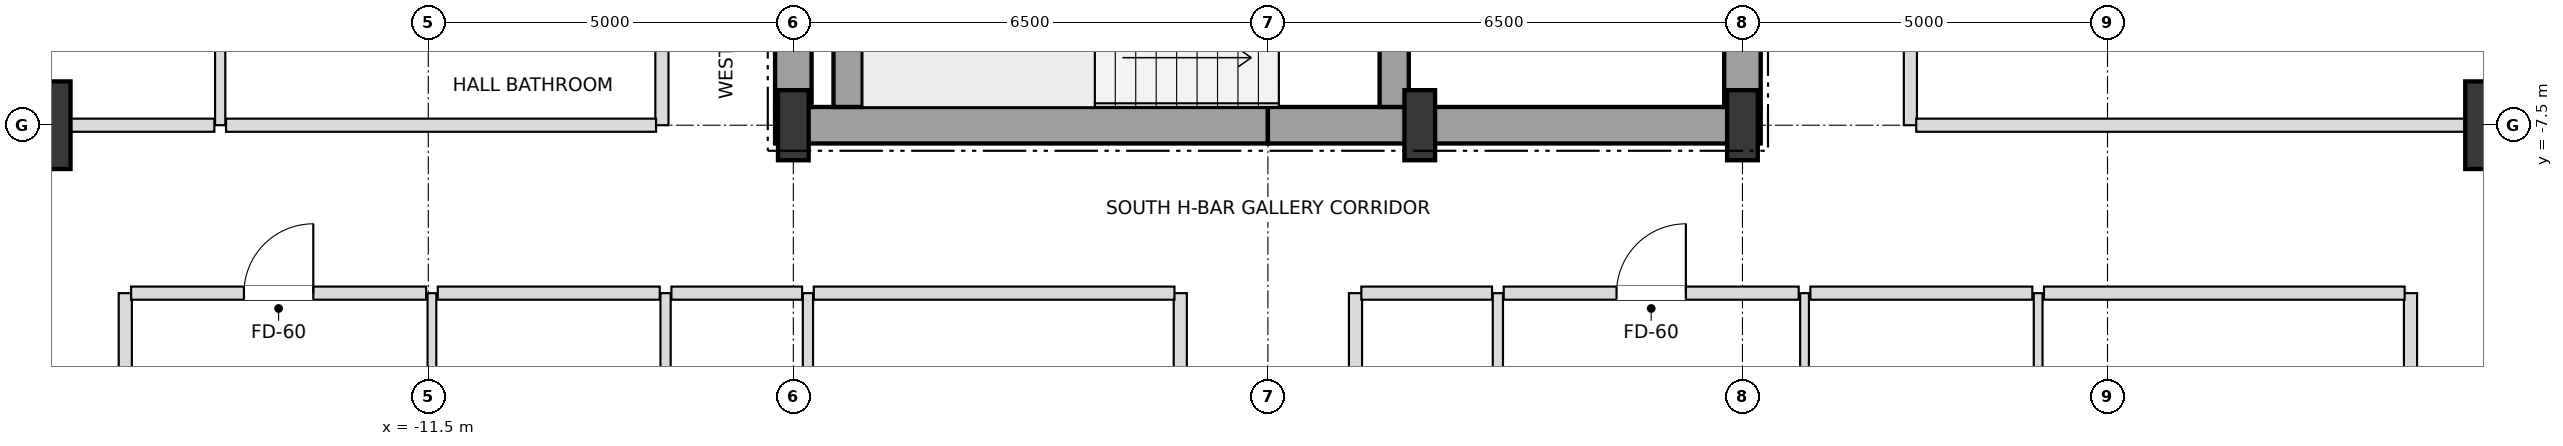
"""IFC4 building model, lengths in metres.
Left out: names, types, materials, properties, quantities, classifications, styles, units other than length and angle.
Written with IfcOpenShell. Run it as: python <this file> out.ifc"""

import sys

from ifc_helpers import new_model, si_unit, direction, frame, frame_2d, origin, origin_2d, place, context, subcontext, project, spatial, rectangle, i_section, extrude, element, fill, save


model = new_model("IFC4")
c1 = context("Model", 3, precision=1e-05, world=origin(), true_north=direction((0.0, 1.0)))
c2 = subcontext(c1, "Body", "Model", "MODEL_VIEW")
j1 = project(units=[si_unit("LENGTHUNIT", "METRE"), si_unit("PLANEANGLEUNIT", "RADIAN")], contexts=[c1])
p1 = place(None, origin())
s1 = spatial("IfcSite", under=j1, at=p1, CompositionType="ELEMENT")
p2 = place(p1, origin())
s2 = spatial("IfcBuilding", under=s1, at=p2, CompositionType="ELEMENT")
p3 = place(p2, frame((0.0, 0.0, 133.2)))
s3 = spatial("IfcBuildingStorey", under=s2, at=p3, CompositionType="ELEMENT", Elevation=133.2)
for number, where, z_axis, x_axis in (
    (1, (-6.5, -7.5, 0.0), (0.0, 0.0, 1.0), (1.0, 0.0, 0.0)),
    (2, (2.08, -7.5, 0.0), (0.0, 0.0, 1.0), (1.0, 0.0, 0.0)),
    (3, (6.5, -7.5, 0.0), (0.0, 0.0, 1.0), (1.0, 0.0, 0.0)),
):
    element("IfcColumn", number, at=place(p3, frame(where, z_axis=z_axis, x_axis=x_axis)), inside=s3, PredefinedType="COLUMN", context=c2, shape_type="SweptSolid", body=[
        extrude(i_section(OverallWidth=0.42, OverallDepth=0.96, WebThickness=0.022, FlangeThickness=0.034, at=origin_2d()), origin(), (0.0, 0.0, 1.0), 3.6),
    ])
for number, where, z_axis, x_axis in (
    (4, (17.0, -7.5, 0.0), (0.0, 0.0, 1.0), (1.0, 0.0, 0.0)),
    (5, (-17.0, -7.5, 0.0), (0.0, 0.0, 1.0), (1.0, 0.0, 0.0)),
):
    element("IfcColumn", number, at=place(p3, frame(where, z_axis=z_axis, x_axis=x_axis)), inside=s3, PredefinedType="USERDEFINED", context=c2, shape_type="SweptSolid", body=[
        extrude(rectangle(XDim=1.2, YDim=1.2, at=origin_2d()), origin(), (0.0, 0.0, 1.0), 3.6),
    ])
for number, where, z_axis, x_axis in (
    (6, (-6.75, -7.5, 0.0), (0.0, 0.0, 1.0), (1.0, 0.0, 0.0)),
    (7, (0.0, -7.5, 0.0), (0.0, 0.0, 1.0), (1.0, 0.0, 0.0)),
):
    element("IfcWall", number, at=place(p3, frame(where, z_axis=z_axis, x_axis=x_axis)), inside=s3, PredefinedType="SHEAR", context=c2, shape_type="SweptSolid", body=[
        extrude(rectangle(XDim=6.75, YDim=0.5, at=frame_2d((3.375, 0.0))), origin(), (0.0, 0.0, 1.0), 3.38),
    ])
p4 = place(p3, frame((-6.5, -7.25, 0.0), z_axis=(0.0, 0.0, 1.0), x_axis=(0.0, 1.0, 0.0)))
e8 = element("IfcWall", 8, at=p4, inside=s3, PredefinedType="SHEAR", context=c2, shape_type="SweptSolid", body=[
    extrude(rectangle(XDim=3.55, YDim=0.5, at=frame_2d((1.775, 0.0))), origin(), (0.0, 0.0, 1.0), 3.38),
])
p5 = place(p3, frame((6.5, -7.25, 0.0), z_axis=(0.0, 0.0, 1.0), x_axis=(0.0, 1.0, 0.0)))
e9 = element("IfcWall", 9, at=p5, inside=s3, PredefinedType="SHEAR", context=c2, shape_type="SweptSolid", body=[
    extrude(rectangle(XDim=5.75, YDim=0.5, at=frame_2d((2.875, 0.0))), origin(), (0.0, 0.0, 1.0), 3.38),
])
p6 = place(p5, frame((0.85, 0.0, 0.0)))
e10 = element("IfcOpeningElement", 10, at=p6, cuts=e9, PredefinedType="OPENING", context=c2, shape_type="SweptSolid", body=[
    extrude(rectangle(XDim=1.05, YDim=2.15, at=frame_2d((0.525, 1.075))), frame((0.0, 0.26, 0.0), z_axis=(0.0, -1.0, 0.0), x_axis=(1.0, 0.0, 0.0)), (0.0, 0.0, 1.0), 0.52),
])
p7 = place(p3, frame((-5.75, -7.25, 0.0), z_axis=(0.0, 0.0, 1.0), x_axis=(0.0, 1.0, 0.0)))
e11 = element("IfcWall", 11, at=p7, inside=s3, PredefinedType="SHEAR", context=c2, shape_type="SweptSolid", body=[
    extrude(rectangle(XDim=2.9, YDim=0.4, at=frame_2d((1.45, 0.0))), origin(), (0.0, 0.0, 1.0), 3.38),
])
p8 = place(p3, frame((1.73, -7.25, 0.0), z_axis=(0.0, 0.0, 1.0), x_axis=(0.0, 1.0, 0.0)))
e12 = element("IfcWall", 12, at=p8, inside=s3, PredefinedType="SHEAR", context=c2, shape_type="SweptSolid", body=[
    extrude(rectangle(XDim=3.3, YDim=0.4, at=frame_2d((1.65, 0.0))), origin(), (0.0, 0.0, 1.0), 3.38),
])
p9 = place(p8, frame((0.9, 0.0, 0.0)))
e13 = element("IfcOpeningElement", 13, at=p9, cuts=e12, PredefinedType="OPENING", context=c2, shape_type="SweptSolid", body=[
    extrude(rectangle(XDim=1.05, YDim=2.15, at=frame_2d((0.525, 1.075))), frame((0.0, 0.21, 0.0), z_axis=(0.0, -1.0, 0.0), x_axis=(1.0, 0.0, 0.0)), (0.0, 0.0, 1.0), 0.42),
])
p10 = place(p3, frame((-15.65, -17.15, 0.0), z_axis=(0.0, 0.0, 1.0), x_axis=(0.0, 1.0, 0.0)))
e14 = element("IfcWall", 14, at=p10, inside=s3, PredefinedType="PARTITIONING", context=c2, shape_type="SweptSolid", body=[
    extrude(rectangle(XDim=7.35, YDim=0.18, at=frame_2d((3.675, 0.0))), origin(), (0.0, 0.0, 1.0), 2.736),
])
p11 = place(p3, frame((-14.35, -7.5, 0.0), z_axis=(0.0, 0.0, 1.0), x_axis=(0.0, 1.0, 0.0)))
e15 = element("IfcWall", 15, at=p11, inside=s3, PredefinedType="PARTITIONING", context=c2, shape_type="SweptSolid", body=[
    extrude(rectangle(XDim=15.0, YDim=0.14, at=frame_2d((7.5, 0.0))), origin(), (0.0, 0.0, 1.0), 3.38),
])
p12 = place(p11, frame((3.475, 0.0, 0.0)))
e16 = element("IfcOpeningElement", 16, at=p12, cuts=e15, PredefinedType="OPENING", context=c2, shape_type="SweptSolid", body=[
    extrude(rectangle(XDim=0.95, YDim=2.1, at=frame_2d((0.475, 1.05))), frame((0.0, 0.08, 0.0), z_axis=(0.0, -1.0, 0.0), x_axis=(1.0, 0.0, 0.0)), (0.0, 0.0, 1.0), 0.16),
])
p13 = place(p3, frame((-11.45, -17.15, 0.0), z_axis=(0.0, 0.0, 1.0), x_axis=(0.0, 1.0, 0.0)))
e17 = element("IfcWall", 17, at=p13, inside=s3, PredefinedType="PARTITIONING", context=c2, shape_type="SweptSolid", body=[
    extrude(rectangle(XDim=7.35, YDim=0.12, at=frame_2d((3.675, 0.0))), origin(), (0.0, 0.0, 1.0), 2.736),
])
p14 = place(p13, frame((2.687, 0.0, 0.0)))
e18 = element("IfcOpeningElement", 18, at=p14, cuts=e17, PredefinedType="OPENING", context=c2, shape_type="SweptSolid", body=[
    extrude(rectangle(XDim=0.95, YDim=2.1, at=frame_2d((0.475, 1.05))), frame((0.0, 0.07, 0.0), z_axis=(0.0, -1.0, 0.0), x_axis=(1.0, 0.0, 0.0)), (0.0, 0.0, 1.0), 0.14),
])
p15 = place(p3, frame((-8.3, -7.5, 0.0), z_axis=(0.0, 0.0, 1.0), x_axis=(0.0, 1.0, 0.0)))
e19 = element("IfcWall", 19, at=p15, inside=s3, PredefinedType="PARTITIONING", context=c2, shape_type="SweptSolid", body=[
    extrude(rectangle(XDim=15.0, YDim=0.18, at=frame_2d((7.5, 0.0))), origin(), (0.0, 0.0, 1.0), 3.38),
])
p16 = place(p15, frame((2.495, 0.0, 0.0)))
e20 = element("IfcOpeningElement", 20, at=p16, cuts=e19, PredefinedType="OPENING", context=c2, shape_type="SweptSolid", body=[
    extrude(rectangle(XDim=0.95, YDim=2.15, at=frame_2d((0.475, 1.075))), frame((0.0, 0.1, 0.0), z_axis=(0.0, -1.0, 0.0), x_axis=(1.0, 0.0, 0.0)), (0.0, 0.0, 1.0), 0.2),
])
p17 = place(p3, frame((-8.25, -17.15, 0.0), z_axis=(0.0, 0.0, 1.0), x_axis=(0.0, 1.0, 0.0)))
e21 = element("IfcWall", 21, at=p17, inside=s3, PredefinedType="PARTITIONING", context=c2, shape_type="SweptSolid", body=[
    extrude(rectangle(XDim=7.35, YDim=0.14, at=frame_2d((3.675, 0.0))), origin(), (0.0, 0.0, 1.0), 2.816),
])
p18 = place(p17, frame((3.23, 0.0, 0.0)))
e22 = element("IfcOpeningElement", 22, at=p18, cuts=e21, PredefinedType="OPENING", context=c2, shape_type="SweptSolid", body=[
    extrude(rectangle(XDim=0.9, YDim=2.1, at=frame_2d((0.45, 1.05))), frame((0.0, 0.08, 0.0), z_axis=(0.0, -1.0, 0.0), x_axis=(1.0, 0.0, 0.0)), (0.0, 0.0, 1.0), 0.16),
])
p19 = place(p3, frame((-6.3, -23.15, 0.0), z_axis=(0.0, 0.0, 1.0), x_axis=(0.0, 1.0, 0.0)))
e23 = element("IfcWall", 23, at=p19, inside=s3, PredefinedType="PARTITIONING", context=c2, shape_type="SweptSolid", body=[
    extrude(rectangle(XDim=13.35, YDim=0.14, at=frame_2d((6.675, 0.0))), origin(), (0.0, 0.0, 1.0), 2.816),
])
p20 = place(p19, frame((1.399, 0.0, 0.0)))
e24 = element("IfcOpeningElement", 24, at=p20, cuts=e23, PredefinedType="OPENING", context=c2, shape_type="SweptSolid", body=[
    extrude(rectangle(XDim=0.9, YDim=2.1, at=frame_2d((0.45, 1.05))), frame((0.0, 0.08, 0.0), z_axis=(0.0, -1.0, 0.0), x_axis=(1.0, 0.0, 0.0)), (0.0, 0.0, 1.0), 0.16),
])
for number, where, z_axis, x_axis in (
    (25, (-1.2, -23.15, 0.0), (0.0, 0.0, 1.0), (0.0, 1.0, 0.0)),
    (26, (1.2, -23.15, 0.0), (0.0, 0.0, 1.0), (0.0, 1.0, 0.0)),
):
    element("IfcWall", number, at=place(p3, frame(where, z_axis=z_axis, x_axis=x_axis)), inside=s3, PredefinedType="PARTITIONING", context=c2, shape_type="SweptSolid", body=[
        extrude(rectangle(XDim=13.35, YDim=0.18, at=frame_2d((6.675, 0.0))), origin(), (0.0, 0.0, 1.0), 2.816),
    ])
p21 = place(p3, frame((3.15, -17.15, 0.0), z_axis=(0.0, 0.0, 1.0), x_axis=(0.0, 1.0, 0.0)))
e27 = element("IfcWall", 27, at=p21, inside=s3, PredefinedType="PARTITIONING", context=c2, shape_type="SweptSolid", body=[
    extrude(rectangle(XDim=7.35, YDim=0.14, at=frame_2d((3.675, 0.0))), origin(), (0.0, 0.0, 1.0), 3.38),
])
p22 = place(p21, frame((3.23, 0.0, 0.0)))
e28 = element("IfcOpeningElement", 28, at=p22, cuts=e27, PredefinedType="OPENING", context=c2, shape_type="SweptSolid", body=[
    extrude(rectangle(XDim=0.9, YDim=2.1, at=frame_2d((0.45, 1.05))), frame((0.0, 0.08, 0.0), z_axis=(0.0, -1.0, 0.0), x_axis=(1.0, 0.0, 0.0)), (0.0, 0.0, 1.0), 0.16),
])
p23 = place(p3, frame((7.35, -23.15, 0.0), z_axis=(0.0, 0.0, 1.0), x_axis=(0.0, 1.0, 0.0)))
e29 = element("IfcWall", 29, at=p23, inside=s3, PredefinedType="PARTITIONING", context=c2, shape_type="SweptSolid", body=[
    extrude(rectangle(XDim=13.35, YDim=0.12, at=frame_2d((6.675, 0.0))), origin(), (0.0, 0.0, 1.0), 2.816),
])
p24 = place(p23, frame((9.205, 0.0, 0.0)))
e30 = element("IfcOpeningElement", 30, at=p24, cuts=e29, PredefinedType="OPENING", context=c2, shape_type="SweptSolid", body=[
    extrude(rectangle(XDim=0.95, YDim=2.1, at=frame_2d((0.475, 1.05))), frame((0.0, 0.07, 0.0), z_axis=(0.0, -1.0, 0.0), x_axis=(1.0, 0.0, 0.0)), (0.0, 0.0, 1.0), 0.14),
])
p25 = place(p23, frame((1.399, 0.0, 0.0)))
e31 = element("IfcOpeningElement", 31, at=p25, cuts=e29, PredefinedType="OPENING", context=c2, shape_type="SweptSolid", body=[
    extrude(rectangle(XDim=0.9, YDim=2.1, at=frame_2d((0.45, 1.05))), frame((0.0, 0.07, 0.0), z_axis=(0.0, -1.0, 0.0), x_axis=(1.0, 0.0, 0.0)), (0.0, 0.0, 1.0), 0.14),
])
p26 = place(p3, frame((8.8, -7.5, 0.0), z_axis=(0.0, 0.0, 1.0), x_axis=(0.0, 1.0, 0.0)))
e32 = element("IfcWall", 32, at=p26, inside=s3, PredefinedType="PARTITIONING", context=c2, shape_type="SweptSolid", body=[
    extrude(rectangle(XDim=15.0, YDim=0.18, at=frame_2d((7.5, 0.0))), origin(), (0.0, 0.0, 1.0), 3.38),
])
p27 = place(p26, frame((2.075, 0.0, 0.0)))
e33 = element("IfcOpeningElement", 33, at=p27, cuts=e32, PredefinedType="OPENING", context=c2, shape_type="SweptSolid", body=[
    extrude(rectangle(XDim=0.95, YDim=2.15, at=frame_2d((0.475, 1.075))), frame((0.0, 0.1, 0.0), z_axis=(0.0, -1.0, 0.0), x_axis=(1.0, 0.0, 0.0)), (0.0, 0.0, 1.0), 0.2),
])
p28 = place(p26, frame((8.475, 0.0, 0.0)))
e34 = element("IfcOpeningElement", 34, at=p28, cuts=e32, PredefinedType="OPENING", context=c2, shape_type="SweptSolid", body=[
    extrude(rectangle(XDim=0.95, YDim=2.15, at=frame_2d((0.475, 1.075))), frame((0.0, 0.1, 0.0), z_axis=(0.0, -1.0, 0.0), x_axis=(1.0, 0.0, 0.0)), (0.0, 0.0, 1.0), 0.2),
])
p29 = place(p26, frame((13.425, 0.0, 0.0)))
e35 = element("IfcOpeningElement", 35, at=p29, cuts=e32, PredefinedType="OPENING", context=c2, shape_type="SweptSolid", body=[
    extrude(rectangle(XDim=0.95, YDim=2.15, at=frame_2d((0.475, 1.075))), frame((0.0, 0.1, 0.0), z_axis=(0.0, -1.0, 0.0), x_axis=(1.0, 0.0, 0.0)), (0.0, 0.0, 1.0), 0.2),
])
p30 = place(p3, frame((10.55, -23.15, 0.0), z_axis=(0.0, 0.0, 1.0), x_axis=(0.0, 1.0, 0.0)))
e36 = element("IfcWall", 36, at=p30, inside=s3, PredefinedType="PARTITIONING", context=c2, shape_type="SweptSolid", body=[
    extrude(rectangle(XDim=13.35, YDim=0.12, at=frame_2d((6.675, 0.0))), origin(), (0.0, 0.0, 1.0), 2.816),
])
p31 = place(p30, frame((8.687, 0.0, 0.0)))
e37 = element("IfcOpeningElement", 37, at=p31, cuts=e36, PredefinedType="OPENING", context=c2, shape_type="SweptSolid", body=[
    extrude(rectangle(XDim=0.95, YDim=2.1, at=frame_2d((0.475, 1.05))), frame((0.0, 0.07, 0.0), z_axis=(0.0, -1.0, 0.0), x_axis=(1.0, 0.0, 0.0)), (0.0, 0.0, 1.0), 0.14),
])
p32 = place(p30, frame((1.399, 0.0, 0.0)))
e38 = element("IfcOpeningElement", 38, at=p32, cuts=e36, PredefinedType="OPENING", context=c2, shape_type="SweptSolid", body=[
    extrude(rectangle(XDim=0.9, YDim=2.1, at=frame_2d((0.45, 1.05))), frame((0.0, 0.07, 0.0), z_axis=(0.0, -1.0, 0.0), x_axis=(1.0, 0.0, 0.0)), (0.0, 0.0, 1.0), 0.14),
])
p33 = place(p3, frame((15.65, -17.15, 0.0), z_axis=(0.0, 0.0, 1.0), x_axis=(0.0, 1.0, 0.0)))
e39 = element("IfcWall", 39, at=p33, inside=s3, PredefinedType="PARTITIONING", context=c2, shape_type="SweptSolid", body=[
    extrude(rectangle(XDim=7.35, YDim=0.18, at=frame_2d((3.675, 0.0))), origin(), (0.0, 0.0, 1.0), 2.736),
])
p34 = place(p3, frame((-15.57, -9.8, 0.0), z_axis=(0.0, 0.0, 1.0), x_axis=(1.0, 0.0, 0.0)))
e40 = element("IfcWall", 40, at=p34, inside=s3, PredefinedType="PARTITIONING", context=c2, shape_type="SweptSolid", body=[
    extrude(rectangle(XDim=4.04, YDim=0.18, at=frame_2d((2.02, 0.0))), origin(), (0.0, 0.0, 1.0), 3.38),
])
p35 = place(p34, frame((1.545, 0.0, 0.0)))
e41 = element("IfcOpeningElement", 41, at=p35, cuts=e40, PredefinedType="OPENING", context=c2, shape_type="SweptSolid", body=[
    extrude(rectangle(XDim=0.95, YDim=2.15, at=frame_2d((0.475, 1.075))), frame((0.0, 0.1, 0.0), z_axis=(0.0, -1.0, 0.0), x_axis=(1.0, 0.0, 0.0)), (0.0, 0.0, 1.0), 0.2),
])
p36 = place(p3, frame((-11.37, -9.8, 0.0), z_axis=(0.0, 0.0, 1.0), x_axis=(1.0, 0.0, 0.0)))
e42 = element("IfcWall", 42, at=p36, inside=s3, PredefinedType="PARTITIONING", context=c2, shape_type="SweptSolid", body=[
    extrude(rectangle(XDim=3.04, YDim=0.18, at=frame_2d((1.52, 0.0))), origin(), (0.0, 0.0, 1.0), 3.38),
])
p37 = place(p3, frame((-8.17, -9.8, 0.0), z_axis=(0.0, 0.0, 1.0), x_axis=(1.0, 0.0, 0.0)))
e43 = element("IfcWall", 43, at=p37, inside=s3, PredefinedType="PARTITIONING", context=c2, shape_type="SweptSolid", body=[
    extrude(rectangle(XDim=1.79, YDim=0.18, at=frame_2d((0.895, 0.0))), origin(), (0.0, 0.0, 1.0), 2.816),
])
p38 = place(p3, frame((-6.22, -9.8, 0.0), z_axis=(0.0, 0.0, 1.0), x_axis=(1.0, 0.0, 0.0)))
e44 = element("IfcWall", 44, at=p38, inside=s3, PredefinedType="PARTITIONING", context=c2, shape_type="SweptSolid", body=[
    extrude(rectangle(XDim=4.94, YDim=0.18, at=frame_2d((2.47, 0.0))), origin(), (0.0, 0.0, 1.0), 3.38),
])
p39 = place(p3, frame((1.28, -9.8, 0.0), z_axis=(0.0, 0.0, 1.0), x_axis=(1.0, 0.0, 0.0)))
e45 = element("IfcWall", 45, at=p39, inside=s3, PredefinedType="PARTITIONING", context=c2, shape_type="SweptSolid", body=[
    extrude(rectangle(XDim=1.79, YDim=0.18, at=frame_2d((0.895, 0.0))), origin(), (0.0, 0.0, 1.0), 3.38),
])
p40 = place(p3, frame((3.23, -9.8, 0.0), z_axis=(0.0, 0.0, 1.0), x_axis=(1.0, 0.0, 0.0)))
e46 = element("IfcWall", 46, at=p40, inside=s3, PredefinedType="PARTITIONING", context=c2, shape_type="SweptSolid", body=[
    extrude(rectangle(XDim=4.04, YDim=0.18, at=frame_2d((2.02, 0.0))), origin(), (0.0, 0.0, 1.0), 2.816),
])
p41 = place(p40, frame((1.545, 0.0, 0.0)))
e47 = element("IfcOpeningElement", 47, at=p41, cuts=e46, PredefinedType="OPENING", context=c2, shape_type="SweptSolid", body=[
    extrude(rectangle(XDim=0.95, YDim=2.15, at=frame_2d((0.475, 1.075))), frame((0.0, 0.1, 0.0), z_axis=(0.0, -1.0, 0.0), x_axis=(1.0, 0.0, 0.0)), (0.0, 0.0, 1.0), 0.2),
])
p42 = place(p3, frame((7.43, -9.8, 0.0), z_axis=(0.0, 0.0, 1.0), x_axis=(1.0, 0.0, 0.0)))
e48 = element("IfcWall", 48, at=p42, inside=s3, PredefinedType="PARTITIONING", context=c2, shape_type="SweptSolid", body=[
    extrude(rectangle(XDim=3.04, YDim=0.18, at=frame_2d((1.52, 0.0))), origin(), (0.0, 0.0, 1.0), 3.38),
])
p43 = place(p3, frame((10.63, -9.8, 0.0), z_axis=(0.0, 0.0, 1.0), x_axis=(1.0, 0.0, 0.0)))
e49 = element("IfcWall", 49, at=p43, inside=s3, PredefinedType="PARTITIONING", context=c2, shape_type="SweptSolid", body=[
    extrude(rectangle(XDim=4.94, YDim=0.18, at=frame_2d((2.47, 0.0))), origin(), (0.0, 0.0, 1.0), 3.38),
])
p44 = place(p3, frame((-20.15, -7.5, 0.0), z_axis=(0.0, 0.0, 1.0), x_axis=(1.0, 0.0, 0.0)))
e50 = element("IfcWall", 50, at=p44, inside=s3, PredefinedType="PARTITIONING", context=c2, shape_type="SweptSolid", body=[
    extrude(rectangle(XDim=5.72, YDim=0.18, at=frame_2d((2.86, 0.0))), origin(), (0.0, 0.0, 1.0), 2.816),
])
p45 = place(p3, frame((-14.27, -7.5, 0.0), z_axis=(0.0, 0.0, 1.0), x_axis=(1.0, 0.0, 0.0)))
e51 = element("IfcWall", 51, at=p45, inside=s3, PredefinedType="PARTITIONING", context=c2, shape_type="SweptSolid", body=[
    extrude(rectangle(XDim=5.89, YDim=0.18, at=frame_2d((2.945, 0.0))), origin(), (0.0, 0.0, 1.0), 2.816),
])
p46 = place(p3, frame((8.88, -7.5, 0.0), z_axis=(0.0, 0.0, 1.0), x_axis=(1.0, 0.0, 0.0)))
e52 = element("IfcWall", 52, at=p46, inside=s3, PredefinedType="PARTITIONING", context=c2, shape_type="SweptSolid", body=[
    extrude(rectangle(XDim=11.27, YDim=0.18, at=frame_2d((5.635, 0.0))), origin(), (0.0, 0.0, 1.0), 2.816),
])
p47 = place(p35, origin())
e53 = element("IfcDoor", 53, at=p47, inside=s3, OperationType="SINGLE_SWING_RIGHT", PredefinedType="DOOR", context=c2, shape_type="SweptSolid", body=[
    extrude(rectangle(XDim=0.95, YDim=2.15, at=frame_2d((0.475, 1.075))), frame((0.0, 0.025, 0.0), z_axis=(0.0, -1.0, 0.0), x_axis=(1.0, 0.0, 0.0)), (0.0, 0.0, 1.0), 0.05),
])
fill(e41, e53)
p48 = place(p41, origin())
e54 = element("IfcDoor", 54, at=p48, inside=s3, OperationType="SINGLE_SWING_RIGHT", PredefinedType="DOOR", context=c2, shape_type="SweptSolid", body=[
    extrude(rectangle(XDim=0.95, YDim=2.15, at=frame_2d((0.475, 1.075))), frame((0.0, 0.025, 0.0), z_axis=(0.0, -1.0, 0.0), x_axis=(1.0, 0.0, 0.0)), (0.0, 0.0, 1.0), 0.05),
])
fill(e47, e54)
save(model, sys.argv[1])
